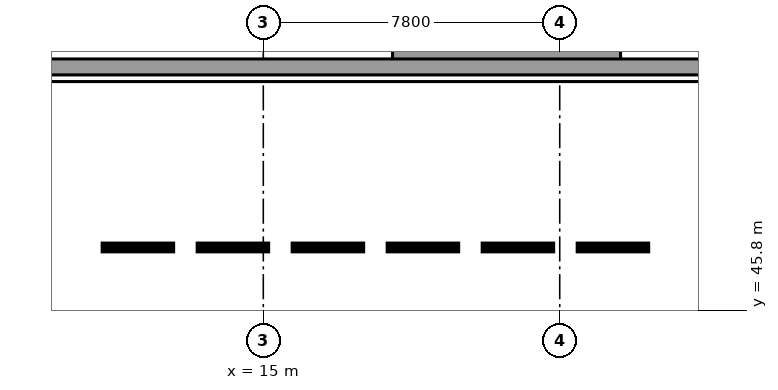
"""IFC4 building model, lengths in metres.
Left out: names, types, materials, properties, quantities, classifications, styles, units other than length and angle.
Written with IfcOpenShell. Run it as: python <this file> out.ifc"""

import sys

from ifc_helpers import new_model, si_unit, direction, frame, frame_2d, origin, place, context, subcontext, project, spatial, rectangle, extrude, element, save


model = new_model("IFC4")
c1 = context("Model", 3, precision=1e-05, world=origin(), true_north=direction((0.0, 1.0)))
c2 = subcontext(c1, "Body", "Model", "MODEL_VIEW")
j1 = project(units=[si_unit("LENGTHUNIT", "METRE"), si_unit("PLANEANGLEUNIT", "RADIAN")], contexts=[c1])
p1 = place(None, origin())
s1 = spatial("IfcSite", under=j1, at=p1, CompositionType="ELEMENT")
p2 = place(p1, origin())
s2 = spatial("IfcBuilding", under=s1, at=p2, CompositionType="ELEMENT")
p3 = place(p2, frame((0.0, 0.0, -8.16)))
s3 = spatial("IfcBuildingStorey", under=s2, at=p3, CompositionType="ELEMENT", Elevation=-8.16)
p4 = place(p3, frame((18.4, 52.55, 0.0), z_axis=(0.0, 0.0, 1.0), x_axis=(1.0, 0.0, 0.0)))
e1 = element("IfcWall", 1, at=p4, inside=s3, PredefinedType="SOLIDWALL", context=c2, shape_type="SweptSolid", body=[
    extrude(rectangle(XDim=6.0, YDim=0.42, at=frame_2d((3.0, 0.0))), origin(), (0.0, 0.0, 1.0), 4.08),
])
p5 = place(p3, frame((1.7, 52.2, 0.0), z_axis=(0.0, 0.0, 1.0), x_axis=(1.0, 0.0, 0.0)))
e2 = element("IfcWall", 2, at=p5, inside=s3, PredefinedType="SOLIDWALL", context=c2, shape_type="SweptSolid", body=[
    extrude(rectangle(XDim=73.4, YDim=0.42, at=frame_2d((36.7, 0.0))), origin(), (0.0, 0.0, 1.0), 3.76),
])
save(model, sys.argv[1])
